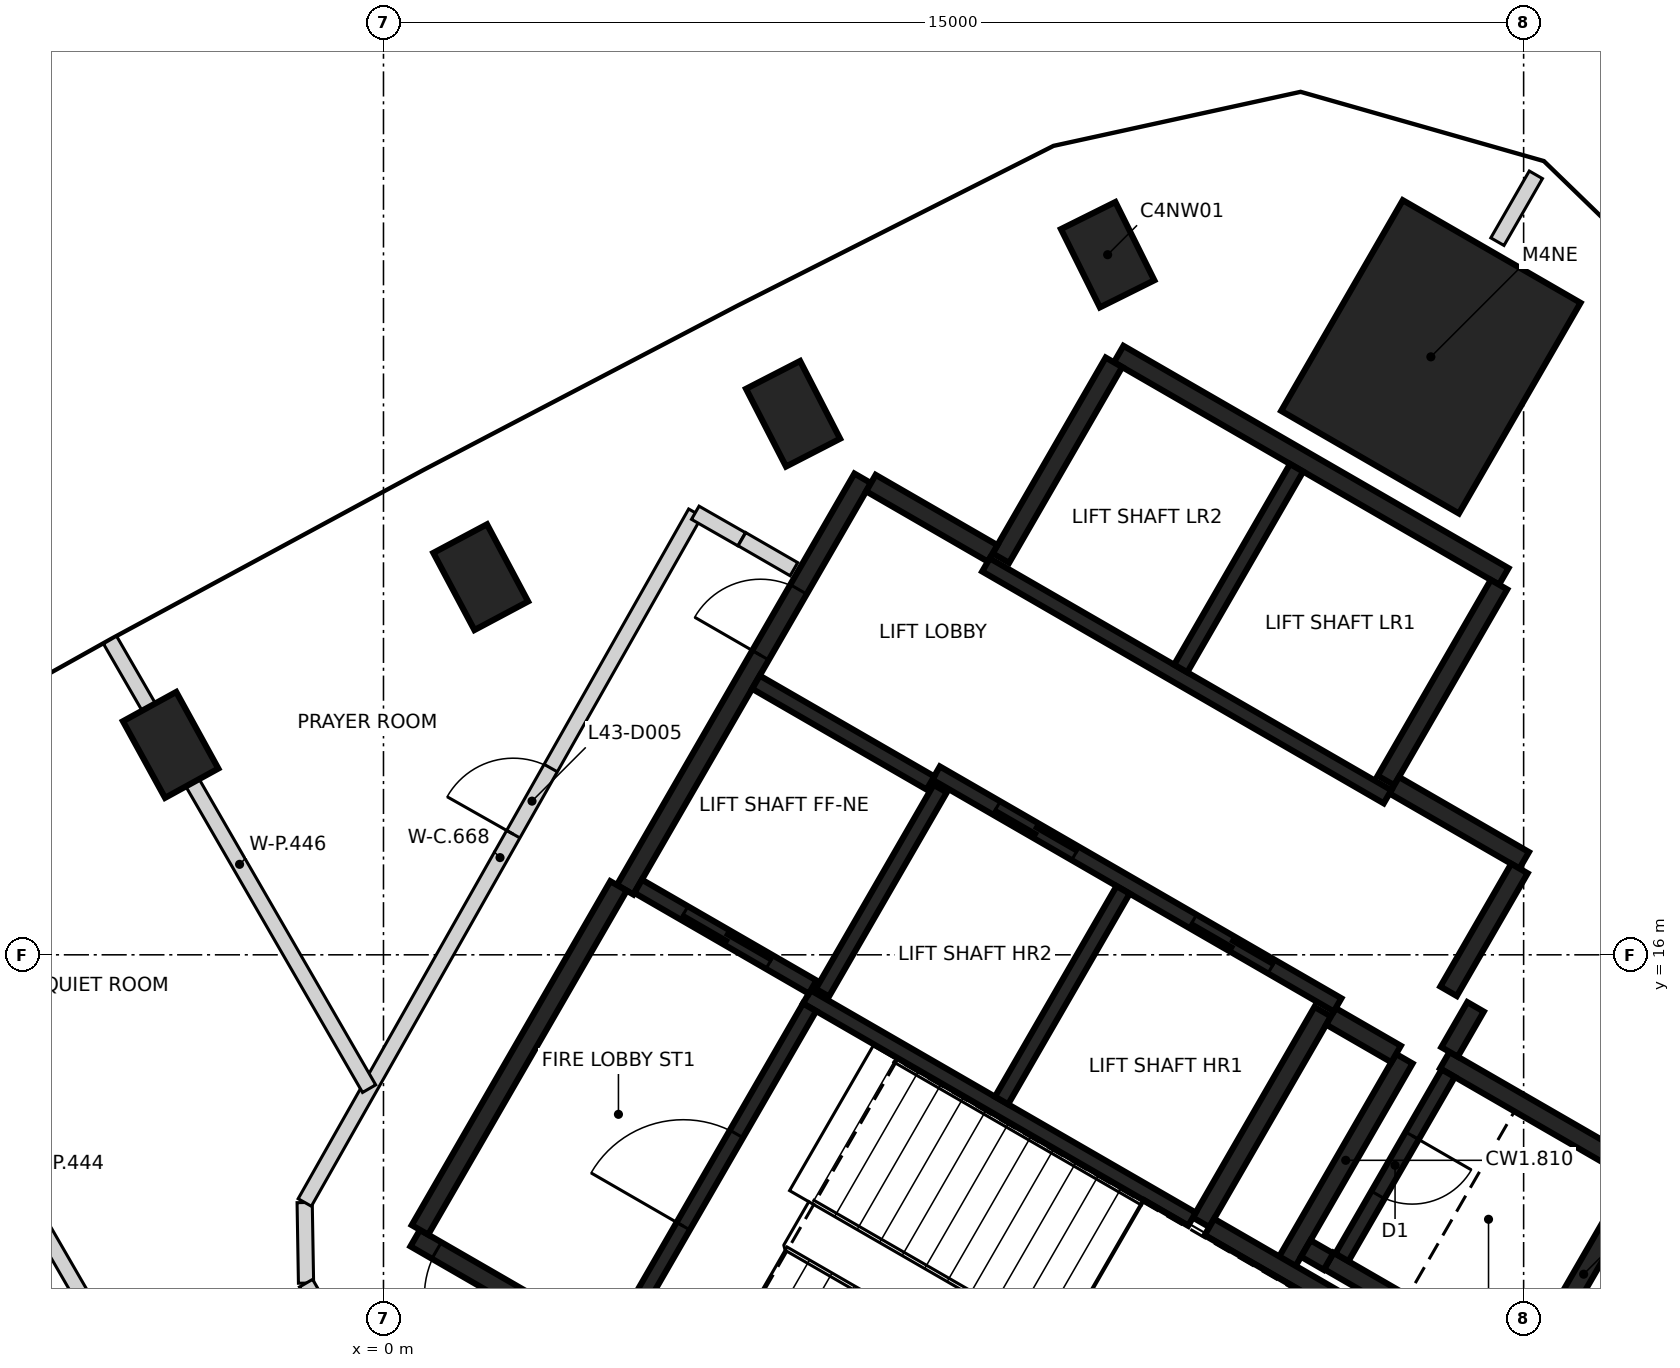
"""IFC4 building model, lengths in metres.
Left out: names, types, materials, properties, quantities, classifications, styles, units other than length and angle.
Written with IfcOpenShell. Run it as: python <this file> out.ifc"""

import sys

from ifc_helpers import new_model, si_unit, direction, frame, frame_2d, origin, origin_2d, place, context, subcontext, project, spatial, rectangle, extrude, element, fill, save


model = new_model("IFC4")
c1 = context("Model", 3, precision=1e-05, world=origin(), true_north=direction((0.0, 1.0)))
c2 = subcontext(c1, "Body", "Model", "MODEL_VIEW")
j1 = project(units=[si_unit("LENGTHUNIT", "METRE"), si_unit("PLANEANGLEUNIT", "RADIAN")], contexts=[c1])
p1 = place(None, origin())
s1 = spatial("IfcSite", under=j1, at=p1, CompositionType="ELEMENT")
p2 = place(p1, origin())
s2 = spatial("IfcBuilding", under=s1, at=p2, CompositionType="ELEMENT")
p3 = place(p2, frame((0.0, 0.0, 175.6)))
s3 = spatial("IfcBuildingStorey", under=s2, at=p3, CompositionType="ELEMENT", Elevation=175.6)
for number, where, z_axis, x_axis in (
    (1, (9.527, 25.211, -0.35), (0.0, 0.0, 1.0), (-0.445, 0.895, 0.0)),
    (2, (5.388, 23.118, -0.35), (0.0, 0.0, 1.0), (-0.458, 0.889, 0.0)),
    (3, (1.279, 20.968, -0.35), (0.0, 0.0, 1.0), (-0.47, 0.883, 0.0)),
    (4, (-2.8, 18.762, -0.35), (0.0, 0.0, 1.0), (-0.482, 0.876, 0.0)),
):
    element("IfcColumn", number, at=place(p3, frame(where, z_axis=z_axis, x_axis=x_axis)), inside=s3, PredefinedType="COLUMN", context=c2, shape_type="SweptSolid", body=[
        extrude(rectangle(XDim=1.15, YDim=0.8, at=origin_2d()), origin(), (0.0, 0.0, 1.0), 3.6),
    ])
p4 = place(p3, frame((13.78, 23.867, -0.35), z_axis=(0.0, 0.0, 1.0), x_axis=(0.5, 0.866025403784, 0.0)))
e5 = element("IfcColumn", 5, at=p4, inside=s3, PredefinedType="COLUMN", context=c2, shape_type="SweptSolid", body=[
    extrude(rectangle(XDim=3.2, YDim=2.7, at=origin_2d()), origin(), (0.0, 0.0, 1.0), 3.6),
])
p5 = place(p3, frame((10.42, 6.498, 0.0), z_axis=(0.0, 0.0, 1.0), x_axis=(-0.866021906294, 0.500006057782, 0.0)))
e6 = element("IfcWall", 6, at=p5, inside=s3, PredefinedType="SHEAR", context=c2, shape_type="SweptSolid", body=[
    extrude(rectangle(XDim=11.55, YDim=0.25, at=frame_2d((5.775, 0.0))), origin(), (0.0, 0.0, 1.0), 3.25),
])
p6 = place(p5, frame((10.025, 0.0, 0.0)))
e7 = element("IfcOpeningElement", 7, at=p6, cuts=e6, PredefinedType="OPENING", context=c2, shape_type="SweptSolid", body=[
    extrude(rectangle(XDim=1.2, YDim=2.1, at=frame_2d((0.6, 1.05))), frame((0.0, 0.135, 0.0), z_axis=(0.0, -1.0, 0.0), x_axis=(1.0, 0.0, 0.0)), (0.0, 0.0, 1.0), 0.27),
])
p7 = place(p5, frame((8.725, 0.0, 0.0)))
e8 = element("IfcOpeningElement", 8, at=p7, cuts=e6, PredefinedType="OPENING", context=c2, shape_type="SweptSolid", body=[
    extrude(rectangle(XDim=1.2, YDim=2.1, at=frame_2d((0.6, 1.05))), frame((0.0, 0.135, 0.0), z_axis=(0.0, -1.0, 0.0), x_axis=(1.0, 0.0, 0.0)), (0.0, 0.0, 1.0), 0.27),
])
p8 = place(p3, frame((3.179, 16.856, 0.0), z_axis=(0.0, 0.0, 1.0), x_axis=(0.500004234368, 0.866022959057, 0.0)))
e9 = element("IfcWall", 9, at=p8, inside=s3, PredefinedType="SHEAR", context=c2, shape_type="SweptSolid", body=[
    extrude(rectangle(XDim=6.25, YDim=0.25, at=frame_2d((3.125, 0.0))), origin(), (0.0, 0.0, 1.0), 3.25),
])
p9 = place(p8, frame((3.563, 0.0, 0.0)))
e10 = element("IfcOpeningElement", 10, at=p9, cuts=e9, PredefinedType="OPENING", context=c2, shape_type="SweptSolid", body=[
    extrude(rectangle(XDim=1.0, YDim=2.1, at=frame_2d((0.5, 1.05))), frame((0.0, 0.135, 0.0), z_axis=(0.0, -1.0, 0.0), x_axis=(1.0, 0.0, 0.0)), (0.0, 0.0, 1.0), 0.27),
])
p10 = place(p3, frame((9.673, 23.903, 0.0), z_axis=(0.0, 0.0, 1.0), x_axis=(0.86603616409, -0.499981362141, 0.0)))
e11 = element("IfcWall", 11, at=p10, inside=s3, PredefinedType="SHEAR", context=c2, shape_type="SweptSolid", body=[
    extrude(rectangle(XDim=5.85, YDim=0.25, at=frame_2d((2.925, 0.0))), origin(), (0.0, 0.0, 1.0), 3.25),
])
p11 = place(p3, frame((0.48, 12.381, 0.0), z_axis=(0.0, 0.0, 1.0), x_axis=(0.49999885962, 0.866026062182, 0.0)))
e12 = element("IfcWall", 12, at=p11, inside=s3, PredefinedType="SHEAR", context=c2, shape_type="SweptSolid", body=[
    extrude(rectangle(XDim=5.225, YDim=0.25, at=frame_2d((2.612, 0.0))), origin(), (0.0, 0.0, 1.0), 3.25),
])
p12 = place(p3, frame((12.357, 15.252, 0.0), z_axis=(0.0, 0.0, 1.0), x_axis=(-0.500028443584, -0.866008981251, 0.0)))
e13 = element("IfcWall", 13, at=p12, inside=s3, PredefinedType="SHEAR", context=c2, shape_type="SweptSolid", body=[
    extrude(rectangle(XDim=3.2, YDim=0.25, at=frame_2d((1.6, 0.0))), origin(), (0.0, 0.0, 1.0), 3.25),
])
for number, where, z_axis, x_axis in (
    (14, (8.123, 21.219, 0.0), (0.0, 0.0, 1.0), (0.5, 0.866, 0.0)),
    (15, (14.676, 20.87, 0.0), (0.0, 0.0, 1.0), (-0.5, -0.866, 0.0)),
):
    element("IfcWall", number, at=place(p3, frame(where, z_axis=z_axis, x_axis=x_axis)), inside=s3, PredefinedType="SHEAR", context=c2, shape_type="SweptSolid", body=[
        extrude(rectangle(XDim=2.975, YDim=0.25, at=frame_2d((1.487, 0.0))), origin(), (0.0, 0.0, 1.0), 3.25),
    ])
p13 = place(p3, frame((16.552, 13.119, 0.0), z_axis=(0.0, 0.0, 1.0), x_axis=(-0.499978833458, -0.866037623948, 0.0)))
e16 = element("IfcWall", 16, at=p13, inside=s3, PredefinedType="SHEAR", context=c2, shape_type="SweptSolid", body=[
    extrude(rectangle(XDim=3.05, YDim=0.25, at=frame_2d((1.525, 0.0))), origin(), (0.0, 0.0, 1.0), 3.25),
])
p14 = place(p3, frame((14.918, 10.54, 0.0), z_axis=(0.0, 0.0, 1.0), x_axis=(-0.866063538972, 0.499933942099, 0.0)))
e17 = element("IfcWall", 17, at=p14, inside=s3, PredefinedType="SHEAR", context=c2, shape_type="SweptSolid", body=[
    extrude(rectangle(XDim=2.865, YDim=0.25, at=frame_2d((1.432, 0.0))), origin(), (0.0, 0.0, 1.0), 3.25),
])
p15 = place(p3, frame((13.963, 14.614, 0.0), z_axis=(0.0, 0.0, 1.0), x_axis=(0.866042235819, -0.499970844928, 0.0)))
e18 = element("IfcWall", 18, at=p15, inside=s3, PredefinedType="SHEAR", context=c2, shape_type="SweptSolid", body=[
    extrude(rectangle(XDim=2.865, YDim=0.25, at=frame_2d((1.432, 0.0))), origin(), (0.0, 0.0, 1.0), 3.25),
])
p16 = place(p3, frame((11.888, 11.961, 0.0), z_axis=(0.0, 0.0, 1.0), x_axis=(0.500003324108, 0.866023484601, 0.0)))
e19 = element("IfcWall", 19, at=p16, inside=s3, PredefinedType="SHEAR", context=c2, shape_type="SweptSolid", body=[
    extrude(rectangle(XDim=3.085, YDim=0.25, at=frame_2d((1.542, 0.0))), origin(), (0.0, 0.0, 1.0), 3.25),
])
p17 = place(p3, frame((10.865, 12.418, 0.0), z_axis=(0.0, 0.0, 1.0), x_axis=(0.866026229868, -0.499998569178, 0.0)))
e20 = element("IfcWall", 20, at=p17, inside=s3, PredefinedType="SHEAR", context=c2, shape_type="SweptSolid", body=[
    extrude(rectangle(XDim=2.449, YDim=0.25, at=frame_2d((1.225, 0.0))), origin(), (0.0, 0.0, 1.0), 3.25),
])
p18 = place(p3, frame((13.297, 18.231, 0.0), z_axis=(0.0, 0.0, 1.0), x_axis=(0.866043531843, -0.499968599967, 0.0)))
e21 = element("IfcWall", 21, at=p18, inside=s3, PredefinedType="SHEAR", context=c2, shape_type="SweptSolid", body=[
    extrude(rectangle(XDim=1.975, YDim=0.25, at=frame_2d((0.987, 0.0))), origin(), (0.0, 0.0, 1.0), 3.25),
])
p19 = place(p3, frame((6.413, 22.206, 0.0), z_axis=(0.0, 0.0, 1.0), x_axis=(0.866016279763, -0.500015802937, 0.0)))
e22 = element("IfcWall", 22, at=p19, inside=s3, PredefinedType="SHEAR", context=c2, shape_type="SweptSolid", body=[
    extrude(rectangle(XDim=1.849, YDim=0.25, at=frame_2d((0.925, 0.0))), origin(), (0.0, 0.0, 1.0), 3.25),
])
p20 = place(p3, frame((14.945, 17.135, 0.0), z_axis=(0.0, 0.0, 1.0), x_axis=(-0.499983108224, -0.866035156036, 0.0)))
e23 = element("IfcWall", 23, at=p20, inside=s3, PredefinedType="SHEAR", context=c2, shape_type="SweptSolid", body=[
    extrude(rectangle(XDim=1.865, YDim=0.25, at=frame_2d((0.932, 0.0))), origin(), (0.0, 0.0, 1.0), 3.25),
])
p21 = place(p3, frame((13.322, 14.695, 0.0), z_axis=(0.0, 0.0, 1.0), x_axis=(-0.866017078145, 0.500014420154, 0.0)))
e24 = element("IfcWall", 24, at=p21, inside=s3, PredefinedType="SHEAR", context=c2, shape_type="SweptSolid", body=[
    extrude(rectangle(XDim=0.989, YDim=0.25, at=frame_2d((0.495, 0.0))), origin(), (0.0, 0.0, 1.0), 3.25),
])
p22 = place(p3, frame((14.368, 15.315, 0.0), z_axis=(0.0, 0.0, 1.0), x_axis=(-0.499897359611, -0.866084655132, 0.0)))
e25 = element("IfcWall", 25, at=p22, inside=s3, PredefinedType="SHEAR", context=c2, shape_type="SweptSolid", body=[
    extrude(rectangle(XDim=0.685, YDim=0.25, at=frame_2d((0.342, 0.0))), origin(), (0.0, 0.0, 1.0), 3.25),
])
p23 = place(p3, frame((12.433, 11.964, 0.0), z_axis=(0.0, 0.0, 1.0), x_axis=(-0.866055875208, 0.499947218231, 0.0)))
e26 = element("IfcWall", 26, at=p23, inside=s3, PredefinedType="SHEAR", context=c2, shape_type="SweptSolid", body=[
    extrude(rectangle(XDim=0.345, YDim=0.25, at=frame_2d((0.172, 0.0))), origin(), (0.0, 0.0, 1.0), 3.25),
])
p24 = place(p3, frame((13.21, 18.08, 0.0), z_axis=(0.0, 0.0, 1.0), x_axis=(-0.866030299012, 0.499991521122, 0.0)))
e27 = element("IfcWall", 27, at=p24, inside=s3, PredefinedType="SHEAR", context=c2, shape_type="SweptSolid", body=[
    extrude(rectangle(XDim=6.1, YDim=0.2, at=frame_2d((3.05, 0.0))), origin(), (0.0, 0.0, 1.0), 3.25),
])
p25 = place(p3, frame((12.552, 15.342, 0.0), z_axis=(0.0, 0.0, 1.0), x_axis=(-0.866030299012, 0.499991521122, 0.0)))
e28 = element("IfcWall", 28, at=p25, inside=s3, PredefinedType="SHEAR", context=c2, shape_type="SweptSolid", body=[
    extrude(rectangle(XDim=6.1, YDim=0.2, at=frame_2d((3.05, 0.0))), origin(), (0.0, 0.0, 1.0), 3.25),
])
p26 = place(p25, frame((1.0, 0.0, 0.0)))
e29 = element("IfcOpeningElement", 29, at=p26, cuts=e28, PredefinedType="OPENING", context=c2, shape_type="SweptSolid", body=[
    extrude(rectangle(XDim=1.2, YDim=2.1, at=frame_2d((0.6, 1.05))), frame((0.0, 0.11, 0.0), z_axis=(0.0, -1.0, 0.0), x_axis=(1.0, 0.0, 0.0)), (0.0, 0.0, 1.0), 0.22),
])
p27 = place(p25, frame((3.982, 0.0, 0.0)))
e30 = element("IfcOpeningElement", 30, at=p27, cuts=e28, PredefinedType="OPENING", context=c2, shape_type="SweptSolid", body=[
    extrude(rectangle(XDim=1.2, YDim=2.1, at=frame_2d((0.6, 1.05))), frame((0.0, 0.11, 0.0), z_axis=(0.0, -1.0, 0.0), x_axis=(1.0, 0.0, 0.0)), (0.0, 0.0, 1.0), 0.22),
])
p28 = place(p3, frame((10.636, 12.521, 0.0), z_axis=(0.0, 0.0, 1.0), x_axis=(-0.866013252188, 0.500021046592, 0.0)))
e31 = element("IfcWall", 31, at=p28, inside=s3, PredefinedType="SHEAR", context=c2, shape_type="SweptSolid", body=[
    extrude(rectangle(XDim=5.851, YDim=0.2, at=frame_2d((2.925, 0.0))), origin(), (0.0, 0.0, 1.0), 3.25),
])
p29 = place(p3, frame((3.057, 10.895, 0.0), z_axis=(0.0, 0.0, 1.0), x_axis=(0.500027839223, 0.866009330205, 0.0)))
e32 = element("IfcWall", 32, at=p29, inside=s3, PredefinedType="SHEAR", context=c2, shape_type="SweptSolid", body=[
    extrude(rectangle(XDim=5.098, YDim=0.2, at=frame_2d((2.549, 0.0))), origin(), (0.0, 0.0, 1.0), 3.25),
])
p30 = place(p29, frame((1.774, 0.0, 0.0)))
e33 = element("IfcOpeningElement", 33, at=p30, cuts=e32, PredefinedType="OPENING", context=c2, shape_type="SweptSolid", body=[
    extrude(rectangle(XDim=1.4, YDim=2.1, at=frame_2d((0.7, 1.05))), frame((0.0, 0.11, 0.0), z_axis=(0.0, -1.0, 0.0), x_axis=(1.0, 0.0, 0.0)), (0.0, 0.0, 1.0), 0.22),
])
p31 = place(p3, frame((8.132, 14.084, 0.0), z_axis=(0.0, 0.0, 1.0), x_axis=(0.500030834389, 0.86600760081, 0.0)))
e34 = element("IfcWall", 34, at=p31, inside=s3, PredefinedType="SHEAR", context=c2, shape_type="SweptSolid", body=[
    extrude(rectangle(XDim=3.198, YDim=0.2, at=frame_2d((1.599, 0.0))), origin(), (0.0, 0.0, 1.0), 3.25),
])
p32 = place(p3, frame((10.489, 19.767, 0.0), z_axis=(0.0, 0.0, 1.0), x_axis=(0.499946628782, 0.866056215479, 0.0)))
e35 = element("IfcWall", 35, at=p32, inside=s3, PredefinedType="SHEAR", context=c2, shape_type="SweptSolid", body=[
    extrude(rectangle(XDim=3.048, YDim=0.2, at=frame_2d((1.524, 0.0))), origin(), (0.0, 0.0, 1.0), 3.25),
])
p33 = place(p3, frame((14.008, 14.442, 0.0), z_axis=(0.0, 0.0, 1.0), x_axis=(-0.499986818241, -0.866033014143, 0.0)))
e36 = element("IfcWall", 36, at=p33, inside=s3, PredefinedType="SHEAR", context=c2, shape_type="SweptSolid", body=[
    extrude(rectangle(XDim=2.798, YDim=0.2, at=frame_2d((1.399, 0.0))), origin(), (0.0, 0.0, 1.0), 3.25),
])
p34 = place(p33, frame((0.949, 0.0, 0.0)))
e37 = element("IfcOpeningElement", 37, at=p34, cuts=e36, PredefinedType="OPENING", context=c2, shape_type="SweptSolid", body=[
    extrude(rectangle(XDim=0.9, YDim=2.1, at=frame_2d((0.45, 1.05))), frame((0.0, 0.11, 0.0), z_axis=(0.0, -1.0, 0.0), x_axis=(1.0, 0.0, 0.0)), (0.0, 0.0, 1.0), 0.22),
])
p35 = place(p3, frame((7.324, 18.187, 0.0), z_axis=(0.0, 0.0, 1.0), x_axis=(-0.499967891604, -0.866043940782, 0.0)))
e38 = element("IfcWall", 38, at=p35, inside=s3, PredefinedType="SHEAR", context=c2, shape_type="SweptSolid", body=[
    extrude(rectangle(XDim=3.1, YDim=0.2, at=frame_2d((1.55, 0.0))), origin(), (0.0, 0.0, 1.0), 3.25),
])
p36 = place(p3, frame((5.646, 15.576, 0.0), z_axis=(0.0, 0.0, 1.0), x_axis=(-0.866018407898, 0.500012117035, 0.0)))
e39 = element("IfcWall", 39, at=p36, inside=s3, PredefinedType="SHEAR", context=c2, shape_type="SweptSolid", body=[
    extrude(rectangle(XDim=2.651, YDim=0.2, at=frame_2d((1.325, 0.0))), origin(), (0.0, 0.0, 1.0), 3.25),
])
p37 = place(p36, frame((0.652, 0.0, 0.0)))
e40 = element("IfcOpeningElement", 40, at=p37, cuts=e39, PredefinedType="OPENING", context=c2, shape_type="SweptSolid", body=[
    extrude(rectangle(XDim=1.3, YDim=2.1, at=frame_2d((0.65, 1.05))), frame((0.0, 0.11, 0.0), z_axis=(0.0, -1.0, 0.0), x_axis=(1.0, 0.0, 0.0)), (0.0, 0.0, 1.0), 0.22),
])
p38 = place(p3, frame((7.196, 18.26, 0.0), z_axis=(0.0, 0.0, 1.0), x_axis=(-0.866018407898, 0.500012117035, 0.0)))
e41 = element("IfcWall", 41, at=p38, inside=s3, PredefinedType="SHEAR", context=c2, shape_type="SweptSolid", body=[
    extrude(rectangle(XDim=2.651, YDim=0.2, at=frame_2d((1.325, 0.0))), origin(), (0.0, 0.0, 1.0), 3.25),
])
p39 = place(p3, frame((-1.037, 12.741, 0.0), z_axis=(0.0, 0.0, 1.0), x_axis=(0.017040362824, -0.999854802476, 0.0)))
e42 = element("IfcWall", 42, at=p39, inside=s3, PredefinedType="PARTITIONING", context=c2, shape_type="SweptSolid", body=[
    extrude(rectangle(XDim=1.06, YDim=0.2, at=frame_2d((0.53, 0.0))), origin(), (0.0, 0.0, 1.0), 3.25),
])
p40 = place(p3, frame((-1.035, 12.742, 0.0), z_axis=(0.0, 0.0, 1.0), x_axis=(0.49267817774, 0.870211591039, 0.0)))
e43 = element("IfcWall", 43, at=p40, inside=s3, PredefinedType="PARTITIONING", context=c2, shape_type="SweptSolid", body=[
    extrude(rectangle(XDim=10.427, YDim=0.2, at=frame_2d((5.214, 0.0))), origin(), (0.0, 0.0, 1.0), 3.25),
])
p41 = place(p40, frame((5.568, 0.0, 0.0)))
e44 = element("IfcOpeningElement", 44, at=p41, cuts=e43, PredefinedType="OPENING", context=c2, shape_type="SweptSolid", body=[
    extrude(rectangle(XDim=1.0, YDim=2.1, at=frame_2d((0.5, 1.05))), frame((0.0, 0.11, 0.0), z_axis=(0.0, -1.0, 0.0), x_axis=(1.0, 0.0, 0.0)), (0.0, 0.0, 1.0), 0.22),
])
p42 = place(p3, frame((-1.019, 11.68, 0.0), z_axis=(0.0, 0.0, 1.0), x_axis=(0.499921088291, -0.866070958688, 0.0)))
e45 = element("IfcWall", 45, at=p42, inside=s3, PredefinedType="PARTITIONING", context=c2, shape_type="SweptSolid", body=[
    extrude(rectangle(XDim=2.625, YDim=0.2, at=frame_2d((1.312, 0.0))), origin(), (0.0, 0.0, 1.0), 3.25),
])
p43 = place(p3, frame((4.102, 21.816, 0.0), z_axis=(0.0, 0.0, 1.0), x_axis=(0.868007826562, -0.496550514074, 0.0)))
e46 = element("IfcWall", 46, at=p43, inside=s3, PredefinedType="PARTITIONING", context=c2, shape_type="SweptSolid", body=[
    extrude(rectangle(XDim=0.703, YDim=0.2, at=frame_2d((0.351, 0.0))), origin(), (0.0, 0.0, 1.0), 3.25),
])
p44 = place(p3, frame((4.716, 21.468, 0.0), z_axis=(0.0, 0.0, 1.0), x_axis=(0.865912682783, -0.500195187698, 0.0)))
e47 = element("IfcWall", 47, at=p44, inside=s3, PredefinedType="PARTITIONING", context=c2, shape_type="SweptSolid", body=[
    extrude(rectangle(XDim=0.79, YDim=0.2, at=frame_2d((0.395, 0.0))), origin(), (0.0, 0.0, 1.0), 3.25),
])
p45 = place(p3, frame((-7.646, 17.879, 0.0), z_axis=(0.0, 0.0, 1.0), x_axis=(0.500047691386, -0.865997867399, 0.0)))
e48 = element("IfcWall", 48, at=p45, inside=s3, PredefinedType="PARTITIONING", context=c2, shape_type="SweptSolid", body=[
    extrude(rectangle(XDim=11.306, YDim=0.2, at=frame_2d((5.653, 0.0))), origin(), (0.0, 0.0, 1.0), 3.25),
])
p46 = place(p3, frame((-3.598, 20.142, 0.0), z_axis=(0.0, 0.0, 1.0), x_axis=(0.500075890333, -0.865981584047, 0.0)))
e49 = element("IfcWall", 49, at=p46, inside=s3, PredefinedType="PARTITIONING", context=c2, shape_type="SweptSolid", body=[
    extrude(rectangle(XDim=6.816, YDim=0.2, at=frame_2d((3.408, 0.0))), origin(), (0.0, 0.0, 1.0), 3.25),
])
p47 = place(p3, frame((14.655, 25.382, 0.0), z_axis=(0.0, 0.0, 1.0), x_axis=(0.498416889665, 0.866937485691, 0.0)))
e50 = element("IfcWall", 50, at=p47, inside=s3, PredefinedType="PARTITIONING", context=c2, shape_type="SweptSolid", body=[
    extrude(rectangle(XDim=1.015, YDim=0.2, at=frame_2d((0.507, 0.0))), origin(), (0.0, 0.0, 1.0), 3.25),
])
p48 = place(p37, origin())
e51 = element("IfcDoor", 51, at=p48, inside=s3, OperationType="SLIDING_TO_RIGHT", PredefinedType="DOOR", context=c2, shape_type="SweptSolid", body=[
    extrude(rectangle(XDim=1.3, YDim=2.1, at=frame_2d((0.65, 1.05))), frame((0.0, 0.025, 0.0), z_axis=(0.0, -1.0, 0.0), x_axis=(1.0, 0.0, 0.0)), (0.0, 0.0, 1.0), 0.05),
])
fill(e40, e51)
p49 = place(p26, origin())
e52 = element("IfcDoor", 52, at=p49, inside=s3, OperationType="DOUBLE_DOOR_SLIDING", PredefinedType="DOOR", context=c2, shape_type="SweptSolid", body=[
    extrude(rectangle(XDim=1.2, YDim=2.1, at=frame_2d((0.6, 1.05))), frame((0.0, 0.025, 0.0), z_axis=(0.0, -1.0, 0.0), x_axis=(1.0, 0.0, 0.0)), (0.0, 0.0, 1.0), 0.05),
])
fill(e29, e52)
p50 = place(p27, origin())
e53 = element("IfcDoor", 53, at=p50, inside=s3, OperationType="DOUBLE_DOOR_SLIDING", PredefinedType="DOOR", context=c2, shape_type="SweptSolid", body=[
    extrude(rectangle(XDim=1.2, YDim=2.1, at=frame_2d((0.6, 1.05))), frame((0.0, 0.025, 0.0), z_axis=(0.0, -1.0, 0.0), x_axis=(1.0, 0.0, 0.0)), (0.0, 0.0, 1.0), 0.05),
])
fill(e30, e53)
p51 = place(p9, origin())
e54 = element("IfcDoor", 54, at=p51, inside=s3, OperationType="SINGLE_SWING_LEFT", PredefinedType="DOOR", context=c2, shape_type="SweptSolid", body=[
    extrude(rectangle(XDim=1.0, YDim=2.1, at=frame_2d((0.5, 1.05))), frame((0.0, 0.025, 0.0), z_axis=(0.0, -1.0, 0.0), x_axis=(1.0, 0.0, 0.0)), (0.0, 0.0, 1.0), 0.05),
])
fill(e10, e54)
p52 = place(p6, origin())
e55 = element("IfcDoor", 55, at=p52, inside=s3, OperationType="SINGLE_SWING_LEFT", PredefinedType="DOOR", context=c2, shape_type="SweptSolid", body=[
    extrude(rectangle(XDim=1.2, YDim=2.1, at=frame_2d((0.6, 1.05))), frame((0.0, 0.025, 0.0), z_axis=(0.0, -1.0, 0.0), x_axis=(1.0, 0.0, 0.0)), (0.0, 0.0, 1.0), 0.05),
])
fill(e7, e55)
p53 = place(p30, origin())
e56 = element("IfcDoor", 56, at=p53, inside=s3, OperationType="SINGLE_SWING_RIGHT", PredefinedType="DOOR", context=c2, shape_type="SweptSolid", body=[
    extrude(rectangle(XDim=1.4, YDim=2.1, at=frame_2d((0.7, 1.05))), frame((0.0, 0.025, 0.0), z_axis=(0.0, -1.0, 0.0), x_axis=(1.0, 0.0, 0.0)), (0.0, 0.0, 1.0), 0.05),
])
fill(e33, e56)
p54 = place(p34, origin())
e57 = element("IfcDoor", 57, at=p54, inside=s3, OperationType="SINGLE_SWING_LEFT", PredefinedType="DOOR", context=c2, shape_type="SweptSolid", body=[
    extrude(rectangle(XDim=0.9, YDim=2.1, at=frame_2d((0.45, 1.05))), frame((0.0, 0.025, 0.0), z_axis=(0.0, -1.0, 0.0), x_axis=(1.0, 0.0, 0.0)), (0.0, 0.0, 1.0), 0.05),
])
fill(e37, e57)
p55 = place(p41, origin())
e58 = element("IfcDoor", 58, at=p55, inside=s3, OperationType="SINGLE_SWING_LEFT", PredefinedType="DOOR", context=c2, shape_type="SweptSolid", body=[
    extrude(rectangle(XDim=1.0, YDim=2.1, at=frame_2d((0.5, 1.05))), frame((0.0, 0.025, 0.0), z_axis=(0.0, -1.0, 0.0), x_axis=(1.0, 0.0, 0.0)), (0.0, 0.0, 1.0), 0.05),
])
fill(e44, e58)
save(model, sys.argv[1])
